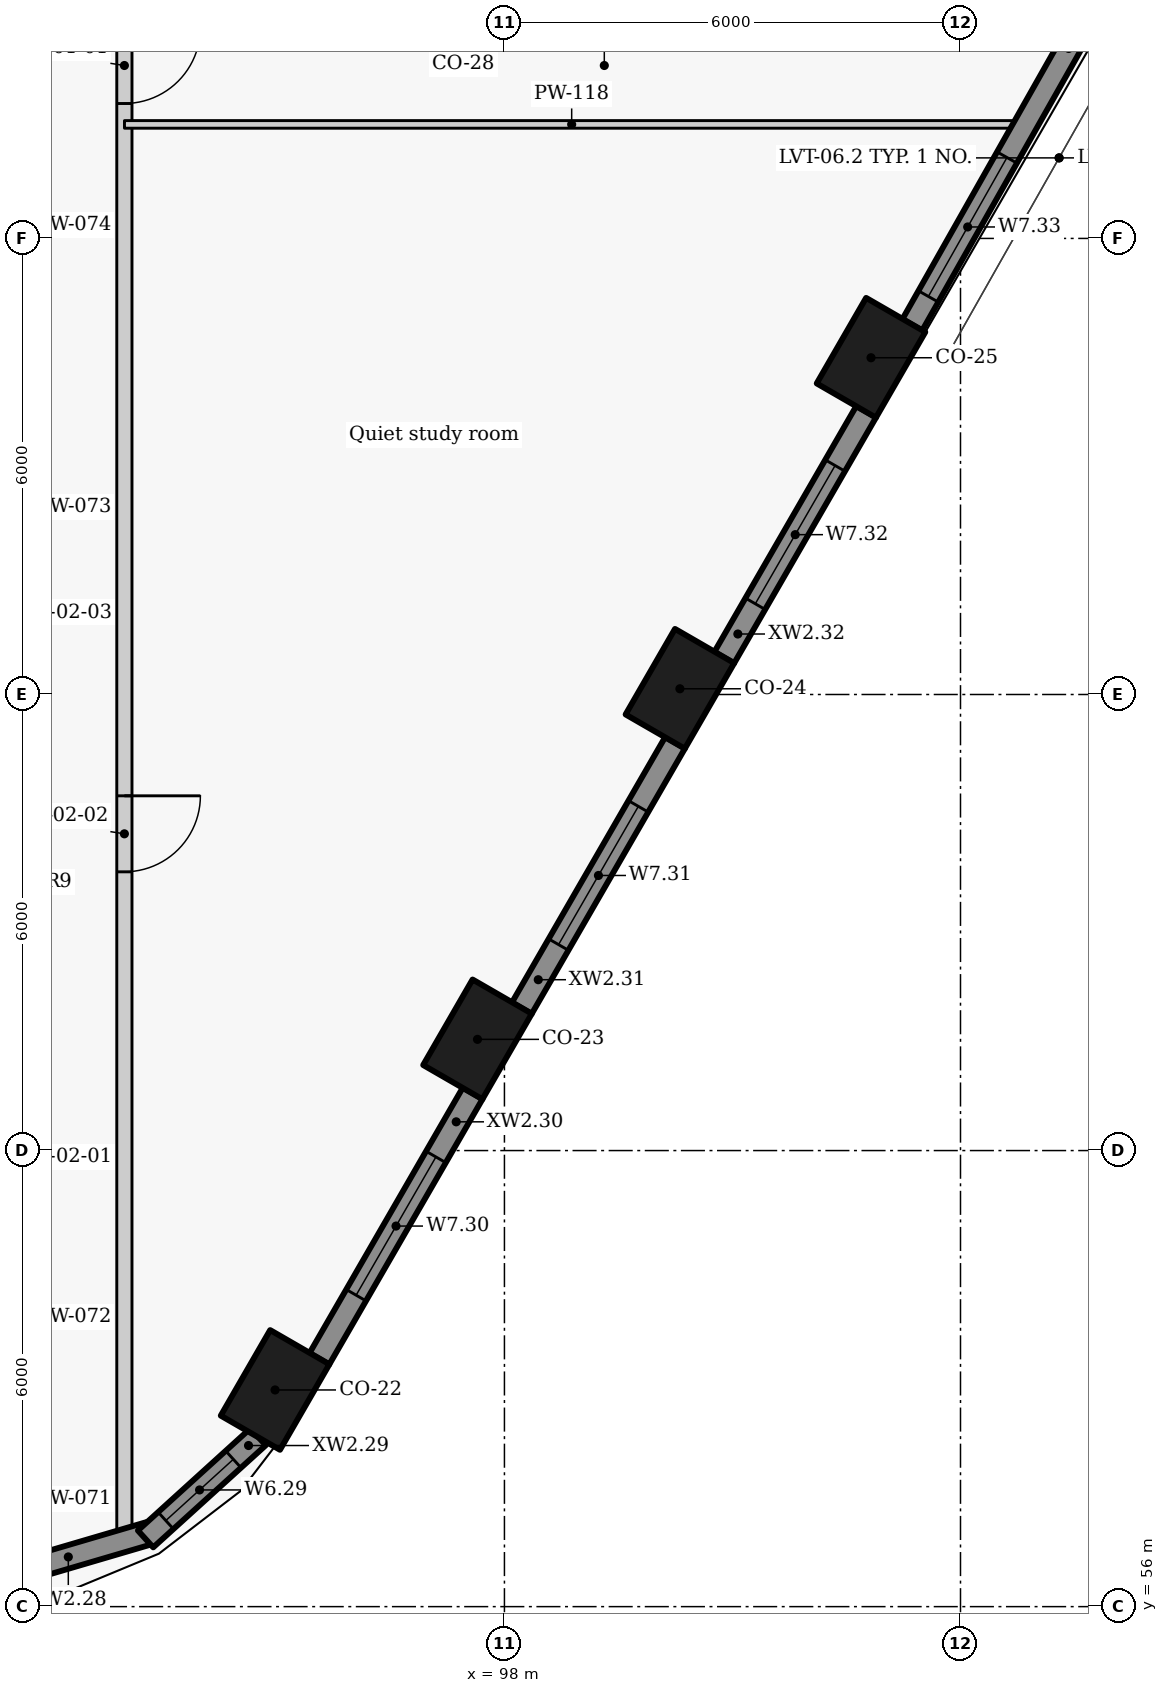
"""IFC4 building model, lengths in metres.
Left out: names, types, materials, properties, quantities, classifications, styles, units other than length and angle.
Written with IfcOpenShell. Run it as: python <this file> out.ifc"""

import sys

from ifc_helpers import new_model, si_unit, direction, frame, frame_2d, origin, origin_2d, place, context, subcontext, project, spatial, rectangle, extrude, element, fill, save


model = new_model("IFC4")
c1 = context("Model", 3, precision=1e-05, world=origin(), true_north=direction((0.0, 1.0)))
c2 = subcontext(c1, "Body", "Model", "MODEL_VIEW")
j1 = project(units=[si_unit("LENGTHUNIT", "METRE"), si_unit("PLANEANGLEUNIT", "RADIAN")], contexts=[c1])
p1 = place(None, origin())
s1 = spatial("IfcSite", under=j1, at=p1, CompositionType="ELEMENT")
p2 = place(p1, origin())
s2 = spatial("IfcBuilding", under=s1, at=p2, CompositionType="ELEMENT")
p3 = place(p2, frame((0.0, 0.0, 140.4)))
s3 = spatial("IfcBuildingStorey", under=s2, at=p3, CompositionType="ELEMENT", Elevation=140.4)
for number, where, z_axis, x_axis in (
    (1, (94.982, 58.851, 0.0), (0.0, 0.0, 1.0), (0.5, 0.866, 0.0)),
    (2, (97.646, 63.463, 0.0), (0.0, 0.0, 1.0), (0.5, 0.866, 0.0)),
    (3, (100.308, 68.075, 0.0), (0.0, 0.0, 1.0), (0.5, 0.866, 0.0)),
    (4, (102.823, 72.43, 0.0), (0.0, 0.0, 1.0), (0.5, 0.866, 0.0)),
):
    element("IfcColumn", number, at=place(p3, frame(where, z_axis=z_axis, x_axis=x_axis)), inside=s3, PredefinedType="COLUMN", context=c2, shape_type="SweptSolid", body=[
        extrude(rectangle(XDim=1.3, YDim=0.9, at=origin_2d()), origin(), (0.0, 0.0, 1.0), 3.3),
    ])
p4 = place(p3, frame((91.153, 56.328, 0.0), z_axis=(0.0, 0.0, 1.0), x_axis=(0.959473072336, 0.281800325517, 0.0)))
e5 = element("IfcWall", 5, at=p4, inside=s3, PredefinedType="SOLIDWALL", context=c2, shape_type="SweptSolid", body=[
    extrude(rectangle(XDim=2.312, YDim=0.3, at=frame_2d((1.156, 0.0))), origin(), (0.0, 0.0, 1.0), 2.425),
])
p5 = place(p3, frame((93.278, 56.89, 0.0), z_axis=(0.0, 0.0, 1.0), x_axis=(0.740652597499, 0.671888182526, 0.0)))
e6 = element("IfcWall", 6, at=p5, inside=s3, PredefinedType="SOLIDWALL", context=c2, shape_type="SweptSolid", body=[
    extrude(rectangle(XDim=1.999, YDim=0.3, at=frame_2d((1.0, 0.0))), origin(), (0.0, 0.0, 1.0), 2.425),
])
p6 = place(p5, frame((0.36, 0.0, 0.9)))
e7 = element("IfcOpeningElement", 7, at=p6, cuts=e6, PredefinedType="OPENING", context=c2, shape_type="SweptSolid", body=[
    extrude(rectangle(XDim=1.2, YDim=1.1, at=frame_2d((0.6, 0.55))), frame((0.0, 0.16, 0.0), z_axis=(0.0, -1.0, 0.0), x_axis=(1.0, 0.0, 0.0)), (0.0, 0.0, 1.0), 0.32),
])
p7 = place(p3, frame((95.565, 59.26, 0.0), z_axis=(0.0, 0.0, 1.0), x_axis=(0.500031546601, 0.86600718958, 0.0)))
e8 = element("IfcWall", 8, at=p7, inside=s3, PredefinedType="SOLIDWALL", context=c2, shape_type="SweptSolid", body=[
    extrude(rectangle(XDim=4.034, YDim=0.3, at=frame_2d((2.017, 0.0))), origin(), (0.0, 0.0, 1.0), 2.425),
])
p8 = place(p7, frame((0.967, 0.0, 0.9)))
e9 = element("IfcOpeningElement", 9, at=p8, cuts=e8, PredefinedType="OPENING", context=c2, shape_type="SweptSolid", body=[
    extrude(rectangle(XDim=2.1, YDim=1.1, at=frame_2d((1.05, 0.55))), frame((0.0, 0.16, 0.0), z_axis=(0.0, -1.0, 0.0), x_axis=(1.0, 0.0, 0.0)), (0.0, 0.0, 1.0), 0.32),
])
p9 = place(p3, frame((98.228, 63.872, 0.0), z_axis=(0.0, 0.0, 1.0), x_axis=(0.500031546601, 0.86600718958, 0.0)))
e10 = element("IfcWall", 10, at=p9, inside=s3, PredefinedType="SOLIDWALL", context=c2, shape_type="SweptSolid", body=[
    extrude(rectangle(XDim=4.034, YDim=0.3, at=frame_2d((2.017, 0.0))), origin(), (0.0, 0.0, 1.0), 2.425),
])
p10 = place(p9, frame((0.967, 0.0, 0.9)))
e11 = element("IfcOpeningElement", 11, at=p10, cuts=e10, PredefinedType="OPENING", context=c2, shape_type="SweptSolid", body=[
    extrude(rectangle(XDim=2.1, YDim=1.1, at=frame_2d((1.05, 0.55))), frame((0.0, 0.16, 0.0), z_axis=(0.0, -1.0, 0.0), x_axis=(1.0, 0.0, 0.0)), (0.0, 0.0, 1.0), 0.32),
])
p11 = place(p3, frame((100.891, 68.485, 0.0), z_axis=(0.0, 0.0, 1.0), x_axis=(0.499933594891, 0.866063739398, 0.0)))
e12 = element("IfcWall", 12, at=p11, inside=s3, PredefinedType="SOLIDWALL", context=c2, shape_type="SweptSolid", body=[
    extrude(rectangle(XDim=3.737, YDim=0.3, at=frame_2d((1.868, 0.0))), origin(), (0.0, 0.0, 1.0), 2.425),
])
p12 = place(p11, frame((0.818, 0.0, 0.9)))
e13 = element("IfcOpeningElement", 13, at=p12, cuts=e12, PredefinedType="OPENING", context=c2, shape_type="SweptSolid", body=[
    extrude(rectangle(XDim=2.1, YDim=1.1, at=frame_2d((1.05, 0.55))), frame((0.0, 0.16, 0.0), z_axis=(0.0, -1.0, 0.0), x_axis=(1.0, 0.0, 0.0)), (0.0, 0.0, 1.0), 0.32),
])
p13 = place(p3, frame((103.366, 72.863, 0.0), z_axis=(0.0, 0.0, 1.0), x_axis=(0.492498306264, 0.87031340236, 0.0)))
e14 = element("IfcWall", 14, at=p13, inside=s3, PredefinedType="SOLIDWALL", context=c2, shape_type="SweptSolid", body=[
    extrude(rectangle(XDim=5.727, YDim=0.3, at=frame_2d((2.863, 0.0))), origin(), (0.0, 0.0, 1.0), 2.425),
])
p14 = place(p13, frame((0.43, 0.0, 0.9)))
e15 = element("IfcOpeningElement", 15, at=p14, cuts=e14, PredefinedType="OPENING", context=c2, shape_type="SweptSolid", body=[
    extrude(rectangle(XDim=2.1, YDim=1.1, at=frame_2d((1.05, 0.55))), frame((0.0, 0.16, 0.0), z_axis=(0.0, -1.0, 0.0), x_axis=(1.0, 0.0, 0.0)), (0.0, 0.0, 1.0), 0.32),
])
p15 = place(p3, frame((93.0, 102.498, 0.0), z_axis=(0.0, 0.0, 1.0), x_axis=(0.0, -1.0, 0.0)))
e16 = element("IfcWall", 16, at=p15, inside=s3, PredefinedType="PARTITIONING", context=c2, shape_type="SweptSolid", body=[
    extrude(rectangle(XDim=45.665, YDim=0.2, at=frame_2d((22.833, 0.0))), origin(), (0.0, 0.0, 1.0), 2.405),
])
p16 = place(p15, frame((35.831, 0.0, 0.0)))
e17 = element("IfcOpeningElement", 17, at=p16, cuts=e16, PredefinedType="OPENING", context=c2, shape_type="SweptSolid", body=[
    extrude(rectangle(XDim=1.0, YDim=2.1, at=frame_2d((0.5, 1.05))), frame((0.0, 0.11, 0.0), z_axis=(0.0, -1.0, 0.0), x_axis=(1.0, 0.0, 0.0)), (0.0, 0.0, 1.0), 0.22),
])
p17 = place(p15, frame((25.723, 0.0, 0.0)))
e18 = element("IfcOpeningElement", 18, at=p17, cuts=e16, PredefinedType="OPENING", context=c2, shape_type="SweptSolid", body=[
    extrude(rectangle(XDim=1.0, YDim=2.1, at=frame_2d((0.5, 1.05))), frame((0.0, 0.11, 0.0), z_axis=(0.0, -1.0, 0.0), x_axis=(1.0, 0.0, 0.0)), (0.0, 0.0, 1.0), 0.22),
])
p18 = place(p15, frame((5.501, 0.0, 0.0)))
e19 = element("IfcOpeningElement", 19, at=p18, cuts=e16, PredefinedType="OPENING", context=c2, shape_type="SweptSolid", body=[
    extrude(rectangle(XDim=1.0, YDim=2.1, at=frame_2d((0.5, 1.05))), frame((0.0, 0.11, 0.0), z_axis=(0.0, -1.0, 0.0), x_axis=(1.0, 0.0, 0.0)), (0.0, 0.0, 1.0), 0.22),
])
p19 = place(p3, frame((93.001, 75.5, 0.0), z_axis=(0.0, 0.0, 1.0), x_axis=(1.0, 0.0, 0.0)))
e20 = element("IfcWall", 20, at=p19, inside=s3, PredefinedType="PARTITIONING", context=c2, shape_type="SweptSolid", body=[
    extrude(rectangle(XDim=11.767, YDim=0.1, at=frame_2d((5.884, 0.0))), origin(), (0.0, 0.0, 1.0), 2.405),
])
p20 = place(p6, origin())
e21 = element("IfcWindow", 21, at=p20, inside=s3, PartitioningType="SINGLE_PANEL", PredefinedType="WINDOW", context=c2, shape_type="SweptSolid", body=[
    extrude(rectangle(XDim=1.2, YDim=1.1, at=frame_2d((0.6, 0.55))), frame((0.0, 0.03, 0.0), z_axis=(0.0, -1.0, 0.0), x_axis=(1.0, 0.0, 0.0)), (0.0, 0.0, 1.0), 0.06),
])
fill(e7, e21)
p21 = place(p8, origin())
e22 = element("IfcWindow", 22, at=p21, inside=s3, PartitioningType="SINGLE_PANEL", PredefinedType="WINDOW", context=c2, shape_type="SweptSolid", body=[
    extrude(rectangle(XDim=2.1, YDim=1.1, at=frame_2d((1.05, 0.55))), frame((0.0, 0.03, 0.0), z_axis=(0.0, -1.0, 0.0), x_axis=(1.0, 0.0, 0.0)), (0.0, 0.0, 1.0), 0.06),
])
fill(e9, e22)
p22 = place(p10, origin())
e23 = element("IfcWindow", 23, at=p22, inside=s3, PartitioningType="SINGLE_PANEL", PredefinedType="WINDOW", context=c2, shape_type="SweptSolid", body=[
    extrude(rectangle(XDim=2.1, YDim=1.1, at=frame_2d((1.05, 0.55))), frame((0.0, 0.03, 0.0), z_axis=(0.0, -1.0, 0.0), x_axis=(1.0, 0.0, 0.0)), (0.0, 0.0, 1.0), 0.06),
])
fill(e11, e23)
p23 = place(p12, origin())
e24 = element("IfcWindow", 24, at=p23, inside=s3, PartitioningType="SINGLE_PANEL", PredefinedType="WINDOW", context=c2, shape_type="SweptSolid", body=[
    extrude(rectangle(XDim=2.1, YDim=1.1, at=frame_2d((1.05, 0.55))), frame((0.0, 0.03, 0.0), z_axis=(0.0, -1.0, 0.0), x_axis=(1.0, 0.0, 0.0)), (0.0, 0.0, 1.0), 0.06),
])
fill(e13, e24)
p24 = place(p14, origin())
e25 = element("IfcWindow", 25, at=p24, inside=s3, PartitioningType="SINGLE_PANEL", PredefinedType="WINDOW", context=c2, shape_type="SweptSolid", body=[
    extrude(rectangle(XDim=2.1, YDim=1.1, at=frame_2d((1.05, 0.55))), frame((0.0, 0.03, 0.0), z_axis=(0.0, -1.0, 0.0), x_axis=(1.0, 0.0, 0.0)), (0.0, 0.0, 1.0), 0.06),
])
fill(e15, e25)
p25 = place(p16, origin())
e26 = element("IfcDoor", 26, at=p25, inside=s3, OperationType="SINGLE_SWING_LEFT", PredefinedType="DOOR", context=c2, shape_type="SweptSolid", body=[
    extrude(rectangle(XDim=1.0, YDim=2.1, at=frame_2d((0.5, 1.05))), frame((0.0, 0.025, 0.0), z_axis=(0.0, -1.0, 0.0), x_axis=(1.0, 0.0, 0.0)), (0.0, 0.0, 1.0), 0.05),
])
fill(e17, e26)
p26 = place(p17, origin())
e27 = element("IfcDoor", 27, at=p26, inside=s3, OperationType="SINGLE_SWING_LEFT", PredefinedType="DOOR", context=c2, shape_type="SweptSolid", body=[
    extrude(rectangle(XDim=1.0, YDim=2.1, at=frame_2d((0.5, 1.05))), frame((0.0, 0.025, 0.0), z_axis=(0.0, -1.0, 0.0), x_axis=(1.0, 0.0, 0.0)), (0.0, 0.0, 1.0), 0.05),
])
fill(e18, e27)
save(model, sys.argv[1])
